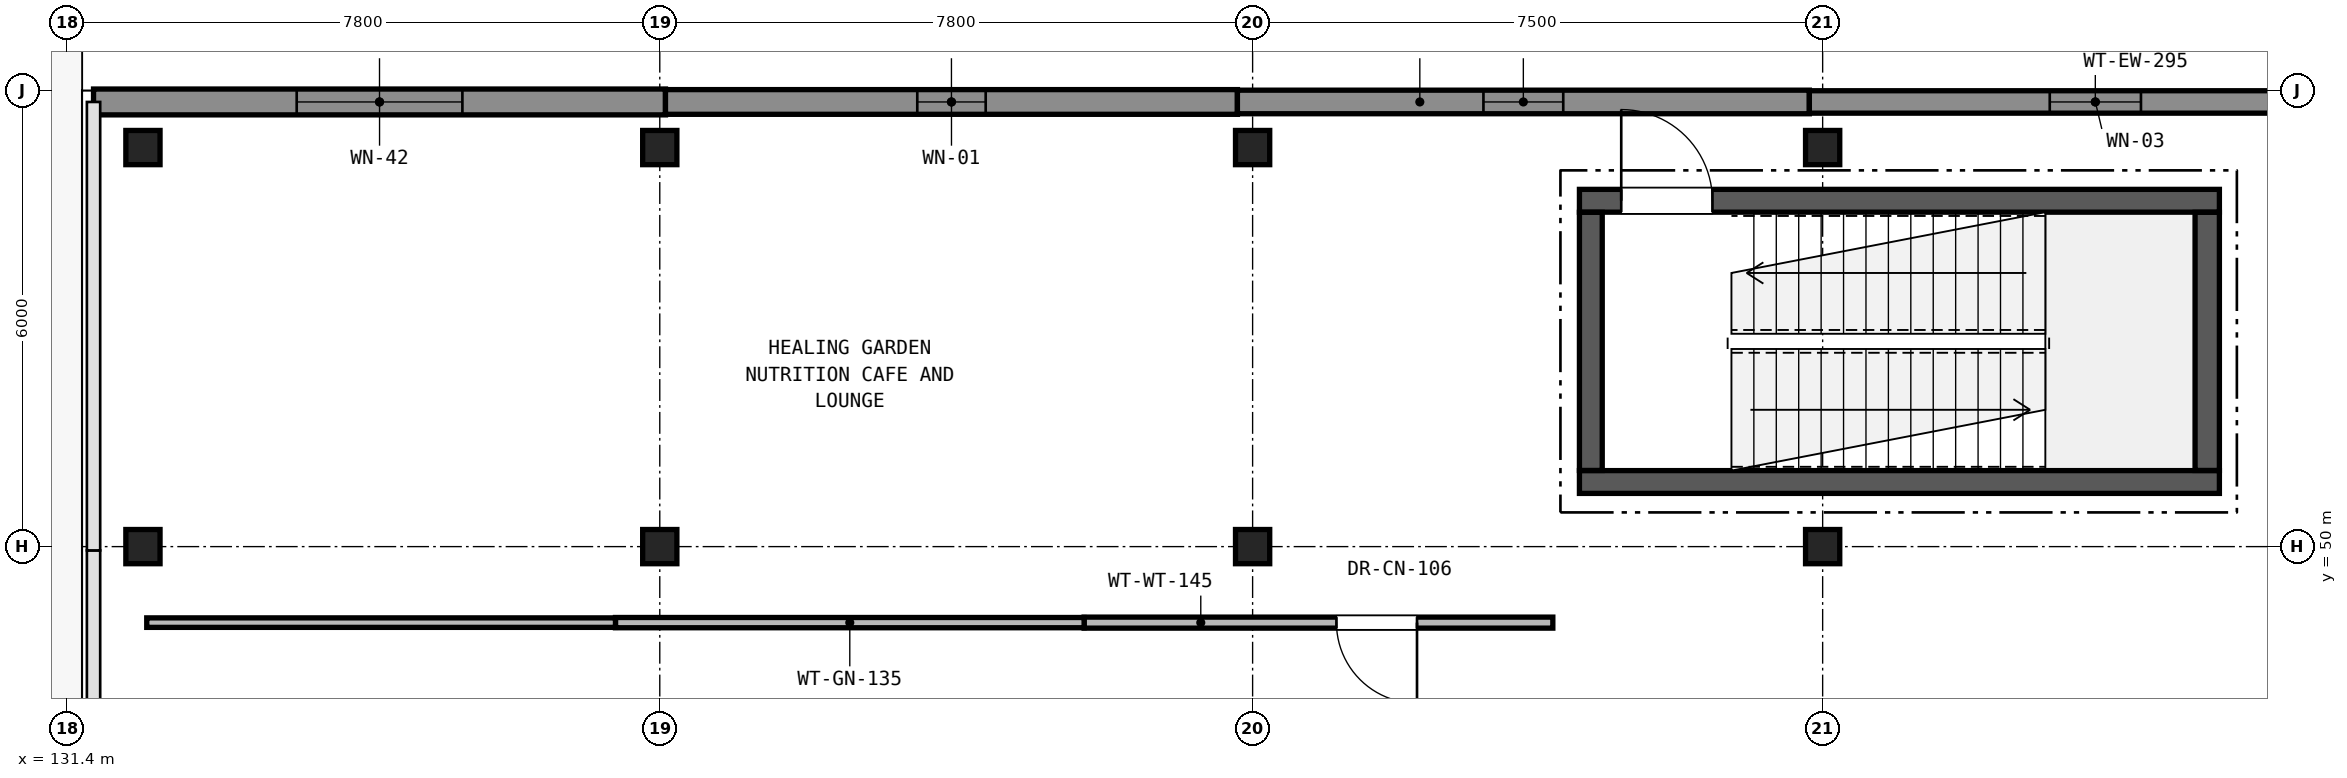
"""IFC4 building model, lengths in metres.
Left out: names, types, materials, properties, quantities, classifications, styles, units other than length and angle.
Written with IfcOpenShell. Run it as: python <this file> out.ifc"""

import sys

from ifc_helpers import new_model, si_unit, direction, frame, frame_2d, origin, origin_2d, place, context, subcontext, project, spatial, rectangle, extrude, element, fill, save


model = new_model("IFC4")
c1 = context("Model", 3, precision=1e-05, world=origin(), true_north=direction((0.0, 1.0)))
c2 = subcontext(c1, "Body", "Model", "MODEL_VIEW")
j1 = project(units=[si_unit("LENGTHUNIT", "METRE"), si_unit("PLANEANGLEUNIT", "RADIAN")], contexts=[c1])
p1 = place(None, origin())
s1 = spatial("IfcSite", under=j1, at=p1, CompositionType="ELEMENT")
p2 = place(p1, origin())
s2 = spatial("IfcBuilding", under=s1, at=p2, CompositionType="ELEMENT")
p3 = place(p2, origin())
s3 = spatial("IfcBuildingStorey", under=s2, at=p3, CompositionType="ELEMENT", Elevation=0.0)
for number, where, z_axis, x_axis in (
    (1, (132.4, 50.0, 0.0), (0.0, 0.0, 1.0), (1.0, 0.0, 0.0)),
    (2, (132.4, 55.25, 0.0), (0.0, 0.0, 1.0), (1.0, 0.0, 0.0)),
    (3, (139.2, 50.0, 0.0), (0.0, 0.0, 1.0), (1.0, 0.0, 0.0)),
    (4, (139.2, 55.25, 0.0), (0.0, 0.0, 1.0), (1.0, 0.0, 0.0)),
    (5, (147.0, 50.0, 0.0), (0.0, 0.0, 1.0), (1.0, 0.0, 0.0)),
    (6, (147.0, 55.25, 0.0), (0.0, 0.0, 1.0), (1.0, 0.0, 0.0)),
    (7, (154.5, 50.0, 0.0), (0.0, 0.0, 1.0), (1.0, 0.0, 0.0)),
    (8, (154.5, 55.25, 0.0), (0.0, 0.0, 1.0), (1.0, 0.0, 0.0)),
):
    element("IfcColumn", number, at=place(p3, frame(where, z_axis=z_axis, x_axis=x_axis)), inside=s3, PredefinedType="COLUMN", context=c2, shape_type="SweptSolid", body=[
        extrude(rectangle(XDim=0.45, YDim=0.45, at=origin_2d()), origin(), (0.0, 0.0, 1.0), 5.1),
    ])
p4 = place(p3, frame((131.75, 55.85, 0.0), z_axis=(0.0, 0.0, 1.0), x_axis=(1.0, 0.0, 0.0)))
e9 = element("IfcWall", 9, at=p4, inside=s3, PredefinedType="SOLIDWALL", context=c2, shape_type="SweptSolid", body=[
    extrude(rectangle(XDim=7.525, YDim=0.34, at=frame_2d((3.762, 0.0))), origin(), (0.0, 0.0, 1.0), 4.825),
])
p5 = place(p4, frame((2.673, 0.0, 0.9)))
e10 = element("IfcOpeningElement", 10, at=p5, cuts=e9, PredefinedType="OPENING", context=c2, shape_type="SweptSolid", body=[
    extrude(rectangle(XDim=2.18, YDim=1.88, at=frame_2d((1.09, 0.94))), frame((0.0, 0.18, 0.0), z_axis=(0.0, -1.0, 0.0), x_axis=(1.0, 0.0, 0.0)), (0.0, 0.0, 1.0), 0.36),
])
p6 = place(p3, frame((139.275, 55.85, 0.0), z_axis=(0.0, 0.0, 1.0), x_axis=(1.0, 0.0, 0.0)))
e11 = element("IfcWall", 11, at=p6, inside=s3, PredefinedType="SOLIDWALL", context=c2, shape_type="SweptSolid", body=[
    extrude(rectangle(XDim=7.525, YDim=0.325, at=frame_2d((3.763, 0.0))), origin(), (0.0, 0.0, 1.0), 4.825),
])
p7 = place(p6, frame((3.313, 0.0, 0.9)))
e12 = element("IfcOpeningElement", 12, at=p7, cuts=e11, PredefinedType="OPENING", context=c2, shape_type="SweptSolid", body=[
    extrude(rectangle(XDim=0.9, YDim=1.5, at=frame_2d((0.45, 0.75))), frame((0.0, 0.172, 0.0), z_axis=(0.0, -1.0, 0.0), x_axis=(1.0, 0.0, 0.0)), (0.0, 0.0, 1.0), 0.345),
])
p8 = place(p3, frame((146.8, 55.85, 0.0), z_axis=(0.0, 0.0, 1.0), x_axis=(1.0, 0.0, 0.0)))
e13 = element("IfcWall", 13, at=p8, inside=s3, PredefinedType="SOLIDWALL", context=c2, shape_type="SweptSolid", body=[
    extrude(rectangle(XDim=7.525, YDim=0.31, at=frame_2d((3.762, 0.0))), origin(), (0.0, 0.0, 1.0), 4.825),
])
p9 = place(p8, frame((3.237, 0.0, 0.9)))
e14 = element("IfcOpeningElement", 14, at=p9, cuts=e13, PredefinedType="OPENING", context=c2, shape_type="SweptSolid", body=[
    extrude(rectangle(XDim=1.05, YDim=1.5, at=frame_2d((0.525, 0.75))), frame((0.0, 0.165, 0.0), z_axis=(0.0, -1.0, 0.0), x_axis=(1.0, 0.0, 0.0)), (0.0, 0.0, 1.0), 0.33),
])
p10 = place(p3, frame((154.325, 55.85, 0.0), z_axis=(0.0, 0.0, 1.0), x_axis=(1.0, 0.0, 0.0)))
e15 = element("IfcWall", 15, at=p10, inside=s3, PredefinedType="SOLIDWALL", context=c2, shape_type="SweptSolid", body=[
    extrude(rectangle(XDim=7.525, YDim=0.295, at=frame_2d((3.763, 0.0))), origin(), (0.0, 0.0, 1.0), 4.825),
])
p11 = place(p10, frame((3.163, 0.0, 0.9)))
e16 = element("IfcOpeningElement", 16, at=p11, cuts=e15, PredefinedType="OPENING", context=c2, shape_type="SweptSolid", body=[
    extrude(rectangle(XDim=1.2, YDim=1.5, at=frame_2d((0.6, 0.75))), frame((0.0, 0.157, 0.0), z_axis=(0.0, -1.0, 0.0), x_axis=(1.0, 0.0, 0.0)), (0.0, 0.0, 1.0), 0.315),
])
p12 = place(p3, frame((151.3, 50.85, 0.0), z_axis=(0.0, 0.0, 1.0), x_axis=(1.0, 0.0, 0.0)))
e17 = element("IfcWall", 17, at=p12, inside=s3, PredefinedType="SHEAR", context=c2, shape_type="SweptSolid", body=[
    extrude(rectangle(XDim=8.42, YDim=0.3, at=frame_2d((4.21, 0.0))), origin(), (0.0, 0.0, 1.0), 4.825),
])
p13 = place(p3, frame((151.3, 54.55, 0.0), z_axis=(0.0, 0.0, 1.0), x_axis=(1.0, 0.0, 0.0)))
e18 = element("IfcWall", 18, at=p13, inside=s3, PredefinedType="SHEAR", context=c2, shape_type="SweptSolid", body=[
    extrude(rectangle(XDim=8.42, YDim=0.3, at=frame_2d((4.21, 0.0))), origin(), (0.0, 0.0, 1.0), 4.825),
])
p14 = place(p13, frame((0.55, 0.0, 0.0)))
e19 = element("IfcOpeningElement", 19, at=p14, cuts=e18, PredefinedType="OPENING", context=c2, shape_type="SweptSolid", body=[
    extrude(rectangle(XDim=1.2, YDim=2.2, at=frame_2d((0.6, 1.1))), frame((0.0, 0.16, 0.0), z_axis=(0.0, -1.0, 0.0), x_axis=(1.0, 0.0, 0.0)), (0.0, 0.0, 1.0), 0.32),
])
p15 = place(p3, frame((151.45, 51.002, 0.0), z_axis=(0.0, 0.0, 1.0), x_axis=(0.0, 1.0, 0.0)))
e20 = element("IfcWall", 20, at=p15, inside=s3, PredefinedType="SHEAR", context=c2, shape_type="SweptSolid", body=[
    extrude(rectangle(XDim=3.396, YDim=0.3, at=frame_2d((1.698, 0.0))), origin(), (0.0, 0.0, 1.0), 4.825),
])
p16 = place(p3, frame((159.56, 51.002, 0.0), z_axis=(0.0, 0.0, 1.0), x_axis=(0.0, 1.0, 0.0)))
e21 = element("IfcWall", 21, at=p16, inside=s3, PredefinedType="SHEAR", context=c2, shape_type="SweptSolid", body=[
    extrude(rectangle(XDim=3.396, YDim=0.32, at=frame_2d((1.698, 0.0))), origin(), (0.0, 0.0, 1.0), 4.825),
])
p17 = place(p3, frame((150.95, 49.0, 0.0), z_axis=(0.0, 0.0, 1.0), x_axis=(-1.0, 0.0, 0.0)))
e22 = element("IfcWall", 22, at=p17, inside=s3, PredefinedType="PARTITIONING", context=c2, shape_type="SweptSolid", body=[
    extrude(rectangle(XDim=6.167, YDim=0.145, at=frame_2d((3.083, 0.0))), origin(), (0.0, 0.0, 1.0), 4.025),
])
p18 = place(p17, frame((1.787, 0.0, 0.0)))
e23 = element("IfcOpeningElement", 23, at=p18, cuts=e22, PredefinedType="OPENING", context=c2, shape_type="SweptSolid", body=[
    extrude(rectangle(XDim=1.06, YDim=2.15, at=frame_2d((0.53, 1.075))), frame((0.0, 0.083, 0.0), z_axis=(0.0, -1.0, 0.0), x_axis=(1.0, 0.0, 0.0)), (0.0, 0.0, 1.0), 0.165),
])
p19 = place(p3, frame((144.783, 49.0, 0.0), z_axis=(0.0, 0.0, 1.0), x_axis=(-1.0, 0.0, 0.0)))
e24 = element("IfcWall", 24, at=p19, inside=s3, PredefinedType="PARTITIONING", context=c2, shape_type="SweptSolid", body=[
    extrude(rectangle(XDim=6.166, YDim=0.135, at=frame_2d((3.083, 0.0))), origin(), (0.0, 0.0, 1.0), 4.175),
])
p20 = place(p3, frame((138.617, 49.0, 0.0), z_axis=(0.0, 0.0, 1.0), x_axis=(-1.0, 0.0, 0.0)))
e25 = element("IfcWall", 25, at=p20, inside=s3, PredefinedType="PARTITIONING", context=c2, shape_type="SweptSolid", body=[
    extrude(rectangle(XDim=6.167, YDim=0.125, at=frame_2d((3.083, 0.0))), origin(), (0.0, 0.0, 1.0), 4.275),
])
p21 = place(p5, origin())
e26 = element("IfcWindow", 26, at=p21, inside=s3, PartitioningType="SINGLE_PANEL", PredefinedType="WINDOW", context=c2, shape_type="SweptSolid", body=[
    extrude(rectangle(XDim=2.18, YDim=1.88, at=frame_2d((1.09, 0.94))), frame((0.0, 0.03, 0.0), z_axis=(0.0, -1.0, 0.0), x_axis=(1.0, 0.0, 0.0)), (0.0, 0.0, 1.0), 0.06),
])
fill(e10, e26)
p22 = place(p7, origin())
e27 = element("IfcWindow", 27, at=p22, inside=s3, PartitioningType="SINGLE_PANEL", PredefinedType="WINDOW", context=c2, shape_type="SweptSolid", body=[
    extrude(rectangle(XDim=0.9, YDim=1.5, at=frame_2d((0.45, 0.75))), frame((0.0, 0.03, 0.0), z_axis=(0.0, -1.0, 0.0), x_axis=(1.0, 0.0, 0.0)), (0.0, 0.0, 1.0), 0.06),
])
fill(e12, e27)
p23 = place(p9, origin())
e28 = element("IfcWindow", 28, at=p23, inside=s3, PartitioningType="SINGLE_PANEL", PredefinedType="WINDOW", context=c2, shape_type="SweptSolid", body=[
    extrude(rectangle(XDim=1.05, YDim=1.5, at=frame_2d((0.525, 0.75))), frame((0.0, 0.03, 0.0), z_axis=(0.0, -1.0, 0.0), x_axis=(1.0, 0.0, 0.0)), (0.0, 0.0, 1.0), 0.06),
])
fill(e14, e28)
p24 = place(p11, origin())
e29 = element("IfcWindow", 29, at=p24, inside=s3, PartitioningType="SINGLE_PANEL", PredefinedType="WINDOW", context=c2, shape_type="SweptSolid", body=[
    extrude(rectangle(XDim=1.2, YDim=1.5, at=frame_2d((0.6, 0.75))), frame((0.0, 0.03, 0.0), z_axis=(0.0, -1.0, 0.0), x_axis=(1.0, 0.0, 0.0)), (0.0, 0.0, 1.0), 0.06),
])
fill(e16, e29)
p25 = place(p14, origin())
e30 = element("IfcDoor", 30, at=p25, inside=s3, OperationType="SINGLE_SWING_LEFT", PredefinedType="DOOR", context=c2, shape_type="SweptSolid", body=[
    extrude(rectangle(XDim=1.2, YDim=2.2, at=frame_2d((0.6, 1.1))), frame((0.0, 0.025, 0.0), z_axis=(0.0, -1.0, 0.0), x_axis=(1.0, 0.0, 0.0)), (0.0, 0.0, 1.0), 0.05),
])
fill(e19, e30)
p26 = place(p18, origin())
e31 = element("IfcDoor", 31, at=p26, inside=s3, OperationType="SINGLE_SWING_LEFT", PredefinedType="DOOR", context=c2, shape_type="SweptSolid", body=[
    extrude(rectangle(XDim=1.06, YDim=2.15, at=frame_2d((0.53, 1.075))), frame((0.0, 0.025, 0.0), z_axis=(0.0, -1.0, 0.0), x_axis=(1.0, 0.0, 0.0)), (0.0, 0.0, 1.0), 0.05),
])
fill(e23, e31)
save(model, sys.argv[1])
